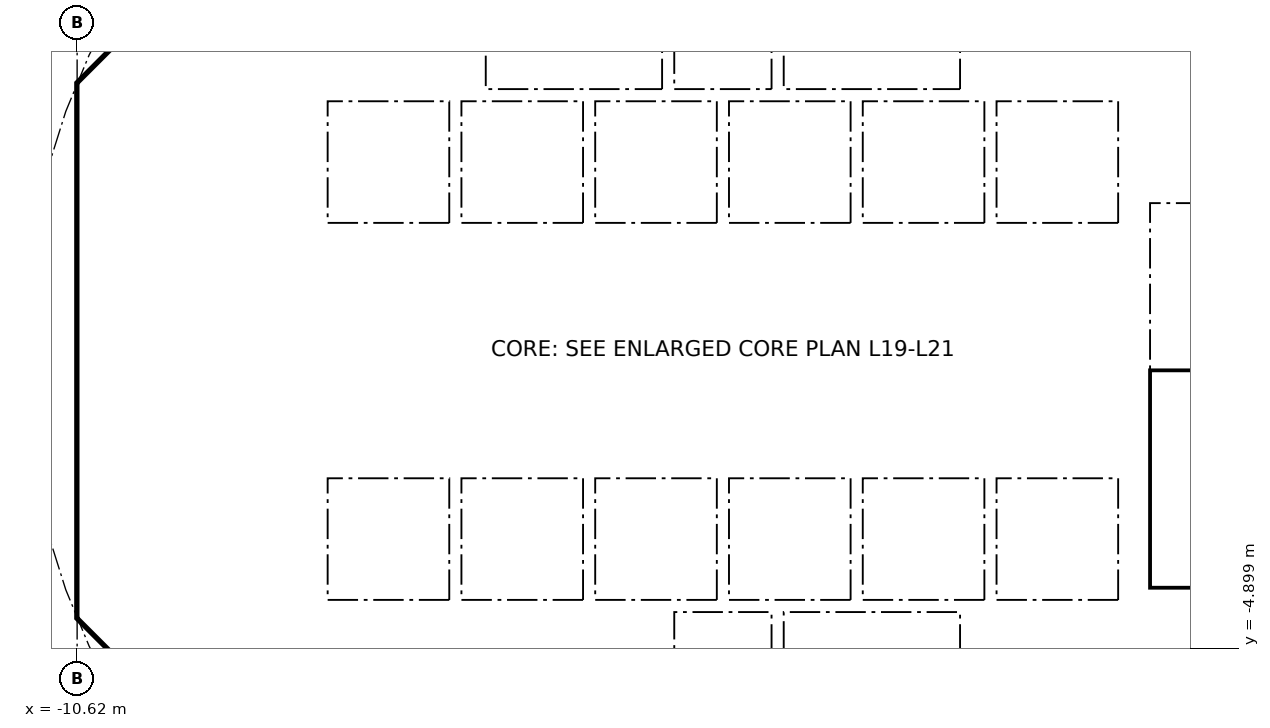
"""IFC4 building model, lengths in metres.
Left out: names, types, materials, properties, quantities, classifications, styles, units other than length and angle.
Written with IfcOpenShell. Run it as: python <this file> out.ifc"""

import sys

from ifc_helpers import new_model, si_unit, direction, frame, frame_2d, origin, place, context, subcontext, project, spatial, polyline, rectangle, outline, extrude, element, fill, save


model = new_model("IFC4")
c1 = context("Model", 3, precision=1e-05, world=origin(), true_north=direction((0.0, 1.0)))
c2 = subcontext(c1, "Body", "Model", "MODEL_VIEW")
j1 = project(units=[si_unit("LENGTHUNIT", "METRE"), si_unit("PLANEANGLEUNIT", "RADIAN")], contexts=[c1])
p1 = place(None, origin())
s1 = spatial("IfcSite", under=j1, at=p1, CompositionType="ELEMENT")
p2 = place(p1, origin())
s2 = spatial("IfcBuilding", under=s1, at=p2, CompositionType="ELEMENT")
p3 = place(p2, frame((0.0, 0.0, 84.4)))
s3 = spatial("IfcBuildingStorey", under=s2, at=p3, CompositionType="ELEMENT", Elevation=84.4)
p4 = place(p3, frame((9.988, 4.613, 0.0), z_axis=(0.0, 0.0, 1.0), x_axis=(-0.707106781187, 0.707106781187, 0.0)))
e1 = element("IfcWall", 1, at=p4, inside=s3, PredefinedType="SHEAR", context=c2, shape_type="SweptSolid", body=[
    extrude(rectangle(XDim=7.602, YDim=0.6, at=frame_2d((3.801, 0.0))), origin(), (0.0, 0.0, 1.0), 3.44),
])
p5 = place(p4, frame((3.201, 0.0, 0.0)))
e2 = element("IfcOpeningElement", 2, at=p5, cuts=e1, PredefinedType="OPENING", context=c2, shape_type="SweptSolid", body=[
    extrude(rectangle(XDim=1.2, YDim=2.1, at=frame_2d((0.6, 1.05))), frame((0.0, 0.31, 0.0), z_axis=(0.0, -1.0, 0.0), x_axis=(1.0, 0.0, 0.0)), (0.0, 0.0, 1.0), 0.62),
])
p6 = place(p3, frame((-4.613, 9.988, 0.0), z_axis=(0.0, 0.0, 1.0), x_axis=(-0.707106781187, -0.707106781187, 0.0)))
e3 = element("IfcWall", 3, at=p6, inside=s3, PredefinedType="SHEAR", context=c2, shape_type="SweptSolid", body=[
    extrude(rectangle(XDim=7.602, YDim=0.6, at=frame_2d((3.801, 0.0))), origin(), (0.0, 0.0, 1.0), 3.44),
])
p7 = place(p6, frame((0.351, 0.0, 0.0)))
e4 = element("IfcOpeningElement", 4, at=p7, cuts=e3, PredefinedType="OPENING", context=c2, shape_type="SweptSolid", body=[
    extrude(rectangle(XDim=1.1, YDim=2.1, at=frame_2d((0.55, 1.05))), frame((0.0, 0.31, 0.0), z_axis=(0.0, -1.0, 0.0), x_axis=(1.0, 0.0, 0.0)), (0.0, 0.0, 1.0), 0.62),
])
p8 = place(p3, frame((-10.325, 3.801, 0.0), z_axis=(0.0, 0.0, 1.0), x_axis=(0.0, -1.0, 0.0)))
e5 = element("IfcWall", 5, at=p8, inside=s3, PredefinedType="SHEAR", context=c2, shape_type="SweptSolid", body=[
    extrude(rectangle(XDim=7.602, YDim=0.6, at=frame_2d((3.801, 0.0))), origin(), (0.0, 0.0, 1.0), 3.44),
])
p9 = place(p8, frame((0.651, 0.0, 0.0)))
e6 = element("IfcOpeningElement", 6, at=p9, cuts=e5, PredefinedType="OPENING", context=c2, shape_type="SweptSolid", body=[
    extrude(rectangle(XDim=1.5, YDim=2.1, at=frame_2d((0.75, 1.05))), frame((0.0, 0.31, 0.0), z_axis=(0.0, -1.0, 0.0), x_axis=(1.0, 0.0, 0.0)), (0.0, 0.0, 1.0), 0.62),
])
p10 = place(p8, frame((5.451, 0.0, 0.0)))
e7 = element("IfcOpeningElement", 7, at=p10, cuts=e5, PredefinedType="OPENING", context=c2, shape_type="SweptSolid", body=[
    extrude(rectangle(XDim=1.5, YDim=2.1, at=frame_2d((0.75, 1.05))), frame((0.0, 0.31, 0.0), z_axis=(0.0, -1.0, 0.0), x_axis=(1.0, 0.0, 0.0)), (0.0, 0.0, 1.0), 0.62),
])
p11 = place(p3, frame((-9.988, -4.613, 0.0), z_axis=(0.0, 0.0, 1.0), x_axis=(0.707106781187, -0.707106781187, 0.0)))
e8 = element("IfcWall", 8, at=p11, inside=s3, PredefinedType="SHEAR", context=c2, shape_type="SweptSolid", body=[
    extrude(rectangle(XDim=7.602, YDim=0.6, at=frame_2d((3.801, 0.0))), origin(), (0.0, 0.0, 1.0), 3.44),
])
p12 = place(p11, frame((6.151, 0.0, 0.0)))
e9 = element("IfcOpeningElement", 9, at=p12, cuts=e8, PredefinedType="OPENING", context=c2, shape_type="SweptSolid", body=[
    extrude(rectangle(XDim=1.1, YDim=2.1, at=frame_2d((0.55, 1.05))), frame((0.0, 0.31, 0.0), z_axis=(0.0, -1.0, 0.0), x_axis=(1.0, 0.0, 0.0)), (0.0, 0.0, 1.0), 0.62),
])
p13 = place(p3, frame((4.613, -9.988, 0.0), z_axis=(0.0, 0.0, 1.0), x_axis=(0.707106781187, 0.707106781187, 0.0)))
e10 = element("IfcWall", 10, at=p13, inside=s3, PredefinedType="SHEAR", context=c2, shape_type="SweptSolid", body=[
    extrude(rectangle(XDim=7.602, YDim=0.6, at=frame_2d((3.801, 0.0))), origin(), (0.0, 0.0, 1.0), 3.44),
])
p14 = place(p13, frame((3.201, 0.0, 0.0)))
e11 = element("IfcOpeningElement", 11, at=p14, cuts=e10, PredefinedType="OPENING", context=c2, shape_type="SweptSolid", body=[
    extrude(rectangle(XDim=1.2, YDim=2.1, at=frame_2d((0.6, 1.05))), frame((0.0, 0.31, 0.0), z_axis=(0.0, -1.0, 0.0), x_axis=(1.0, 0.0, 0.0)), (0.0, 0.0, 1.0), 0.62),
])
p15 = place(p3, frame((-5.8, 4.3, 0.0), z_axis=(0.0, 0.0, 1.0), x_axis=(0.0, 1.0, 0.0)))
e12 = element("IfcWall", 12, at=p15, inside=s3, PredefinedType="PARTITIONING", context=c2, shape_type="SweptSolid", body=[
    extrude(rectangle(XDim=3.927, YDim=0.15, at=frame_2d((1.963, 0.0))), origin(), (0.0, 0.0, 1.0), 3.44),
])
p16 = place(p15, frame((1.551, 0.0, 0.0)))
e13 = element("IfcOpeningElement", 13, at=p16, cuts=e12, PredefinedType="OPENING", context=c2, shape_type="SweptSolid", body=[
    extrude(rectangle(XDim=0.9, YDim=2.1, at=frame_2d((0.45, 1.05))), frame((0.0, 0.085, 0.0), z_axis=(0.0, -1.0, 0.0), x_axis=(1.0, 0.0, 0.0)), (0.0, 0.0, 1.0), 0.17),
])
p17 = place(p3, frame((4.0, 4.3, 0.0), z_axis=(0.0, 0.0, 1.0), x_axis=(0.0, 1.0, 0.0)))
e14 = element("IfcWall", 14, at=p17, inside=s3, PredefinedType="SOLIDWALL", context=c2, shape_type="SweptSolid", body=[
    extrude(rectangle(XDim=2.2, YDim=0.2, at=frame_2d((1.1, 0.0))), origin(), (0.0, 0.0, 1.0), 3.44),
])
p18 = place(p17, frame((0.55, 0.0, 0.0)))
e15 = element("IfcOpeningElement", 15, at=p18, cuts=e14, PredefinedType="OPENING", context=c2, shape_type="SweptSolid", body=[
    extrude(rectangle(XDim=1.1, YDim=2.1, at=frame_2d((0.55, 1.05))), frame((0.0, 0.11, 0.0), z_axis=(0.0, -1.0, 0.0), x_axis=(1.0, 0.0, 0.0)), (0.0, 0.0, 1.0), 0.22),
])
p19 = place(p3, frame((-4.0, 4.3, 0.0), z_axis=(0.0, 0.0, 1.0), x_axis=(0.0, 1.0, 0.0)))
e16 = element("IfcWall", 16, at=p19, inside=s3, PredefinedType="SOLIDWALL", context=c2, shape_type="SweptSolid", body=[
    extrude(rectangle(XDim=2.2, YDim=0.2, at=frame_2d((1.1, 0.0))), origin(), (0.0, 0.0, 1.0), 3.44),
])
p20 = place(p19, frame((0.55, 0.0, 0.0)))
e17 = element("IfcOpeningElement", 17, at=p20, cuts=e16, PredefinedType="OPENING", context=c2, shape_type="SweptSolid", body=[
    extrude(rectangle(XDim=1.1, YDim=2.1, at=frame_2d((0.55, 1.05))), frame((0.0, 0.11, 0.0), z_axis=(0.0, -1.0, 0.0), x_axis=(1.0, 0.0, 0.0)), (0.0, 0.0, 1.0), 0.22),
])
p21 = place(p3, frame((-6.7, 2.0, 0.0), z_axis=(0.0, 0.0, 1.0), x_axis=(1.0, 0.0, 0.0)))
e18 = element("IfcWall", 18, at=p21, inside=s3, PredefinedType="SOLIDWALL", context=c2, shape_type="SweptSolid", body=[
    extrude(rectangle(XDim=13.4, YDim=0.2, at=frame_2d((6.7, 0.0))), origin(), (0.0, 0.0, 1.0), 3.44),
])
p22 = place(p21, frame((0.65, 0.0, 0.0)))
e19 = element("IfcOpeningElement", 19, at=p22, cuts=e18, PredefinedType="OPENING", context=c2, shape_type="SweptSolid", body=[
    extrude(rectangle(XDim=1.1, YDim=2.1, at=frame_2d((0.55, 1.05))), frame((0.0, 0.11, 0.0), z_axis=(0.0, -1.0, 0.0), x_axis=(1.0, 0.0, 0.0)), (0.0, 0.0, 1.0), 0.22),
])
p23 = place(p21, frame((2.85, 0.0, 0.0)))
e20 = element("IfcOpeningElement", 20, at=p23, cuts=e18, PredefinedType="OPENING", context=c2, shape_type="SweptSolid", body=[
    extrude(rectangle(XDim=1.1, YDim=2.1, at=frame_2d((0.55, 1.05))), frame((0.0, 0.11, 0.0), z_axis=(0.0, -1.0, 0.0), x_axis=(1.0, 0.0, 0.0)), (0.0, 0.0, 1.0), 0.22),
])
p24 = place(p21, frame((5.05, 0.0, 0.0)))
e21 = element("IfcOpeningElement", 21, at=p24, cuts=e18, PredefinedType="OPENING", context=c2, shape_type="SweptSolid", body=[
    extrude(rectangle(XDim=1.1, YDim=2.1, at=frame_2d((0.55, 1.05))), frame((0.0, 0.11, 0.0), z_axis=(0.0, -1.0, 0.0), x_axis=(1.0, 0.0, 0.0)), (0.0, 0.0, 1.0), 0.22),
])
p25 = place(p3, frame((6.7, 4.0, 0.0), z_axis=(0.0, 0.0, 1.0), x_axis=(1.0, 0.0, 0.0)))
e22 = element("IfcWall", 22, at=p25, inside=s3, PredefinedType="SOLIDWALL", context=c2, shape_type="SweptSolid", body=[
    extrude(rectangle(XDim=3.325, YDim=0.2, at=frame_2d((1.662, 0.0))), origin(), (0.0, 0.0, 1.0), 3.44),
])
p26 = place(p25, frame((1.25, 0.0, 0.0)))
e23 = element("IfcOpeningElement", 23, at=p26, cuts=e22, PredefinedType="OPENING", context=c2, shape_type="SweptSolid", body=[
    extrude(rectangle(XDim=1.1, YDim=2.1, at=frame_2d((0.55, 1.05))), frame((0.0, 0.11, 0.0), z_axis=(0.0, -1.0, 0.0), x_axis=(1.0, 0.0, 0.0)), (0.0, 0.0, 1.0), 0.22),
])
p27 = place(p3, frame((-6.2, -7.827, 0.0), z_axis=(0.0, 0.0, 1.0), x_axis=(0.0, 1.0, 0.0)))
e24 = element("IfcWall", 24, at=p27, inside=s3, PredefinedType="PARTITIONING", context=c2, shape_type="SweptSolid", body=[
    extrude(rectangle(XDim=3.527, YDim=0.15, at=frame_2d((1.763, 0.0))), origin(), (0.0, 0.0, 1.0), 3.44),
])
p28 = place(p27, frame((2.365, 0.0, 0.0)))
e25 = element("IfcOpeningElement", 25, at=p28, cuts=e24, PredefinedType="OPENING", context=c2, shape_type="SweptSolid", body=[
    extrude(rectangle(XDim=0.9, YDim=2.1, at=frame_2d((0.45, 1.05))), frame((0.0, 0.085, 0.0), z_axis=(0.0, -1.0, 0.0), x_axis=(1.0, 0.0, 0.0)), (0.0, 0.0, 1.0), 0.17),
])
p29 = place(p27, frame((0.489, 0.0, 0.0)))
e26 = element("IfcOpeningElement", 26, at=p29, cuts=e24, PredefinedType="OPENING", context=c2, shape_type="SweptSolid", body=[
    extrude(rectangle(XDim=0.9, YDim=2.1, at=frame_2d((0.45, 1.05))), frame((0.0, 0.085, 0.0), z_axis=(0.0, -1.0, 0.0), x_axis=(1.0, 0.0, 0.0)), (0.0, 0.0, 1.0), 0.17),
])
p30 = place(p3, frame((4.0, -6.5, 0.0), z_axis=(0.0, 0.0, 1.0), x_axis=(0.0, 1.0, 0.0)))
e27 = element("IfcWall", 27, at=p30, inside=s3, PredefinedType="SOLIDWALL", context=c2, shape_type="SweptSolid", body=[
    extrude(rectangle(XDim=2.2, YDim=0.2, at=frame_2d((1.1, 0.0))), origin(), (0.0, 0.0, 1.0), 3.44),
])
p31 = place(p30, frame((0.55, 0.0, 0.0)))
e28 = element("IfcOpeningElement", 28, at=p31, cuts=e27, PredefinedType="OPENING", context=c2, shape_type="SweptSolid", body=[
    extrude(rectangle(XDim=1.1, YDim=2.1, at=frame_2d((0.55, 1.05))), frame((0.0, 0.11, 0.0), z_axis=(0.0, -1.0, 0.0), x_axis=(1.0, 0.0, 0.0)), (0.0, 0.0, 1.0), 0.22),
])
p32 = place(p3, frame((-4.0, -6.5, 0.0), z_axis=(0.0, 0.0, 1.0), x_axis=(0.0, 1.0, 0.0)))
e29 = element("IfcWall", 29, at=p32, inside=s3, PredefinedType="SOLIDWALL", context=c2, shape_type="SweptSolid", body=[
    extrude(rectangle(XDim=2.2, YDim=0.2, at=frame_2d((1.1, 0.0))), origin(), (0.0, 0.0, 1.0), 3.44),
])
p33 = place(p32, frame((0.65, 0.0, 0.0)))
e30 = element("IfcOpeningElement", 30, at=p33, cuts=e29, PredefinedType="OPENING", context=c2, shape_type="SweptSolid", body=[
    extrude(rectangle(XDim=0.9, YDim=2.1, at=frame_2d((0.45, 1.05))), frame((0.0, 0.11, 0.0), z_axis=(0.0, -1.0, 0.0), x_axis=(1.0, 0.0, 0.0)), (0.0, 0.0, 1.0), 0.22),
])
p34 = place(p3, frame((-6.7, -2.0, 0.0), z_axis=(0.0, 0.0, 1.0), x_axis=(1.0, 0.0, 0.0)))
e31 = element("IfcWall", 31, at=p34, inside=s3, PredefinedType="SOLIDWALL", context=c2, shape_type="SweptSolid", body=[
    extrude(rectangle(XDim=13.4, YDim=0.2, at=frame_2d((6.7, 0.0))), origin(), (0.0, 0.0, 1.0), 3.44),
])
p35 = place(p34, frame((0.65, 0.0, 0.0)))
e32 = element("IfcOpeningElement", 32, at=p35, cuts=e31, PredefinedType="OPENING", context=c2, shape_type="SweptSolid", body=[
    extrude(rectangle(XDim=1.1, YDim=2.1, at=frame_2d((0.55, 1.05))), frame((0.0, 0.11, 0.0), z_axis=(0.0, -1.0, 0.0), x_axis=(1.0, 0.0, 0.0)), (0.0, 0.0, 1.0), 0.22),
])
p36 = place(p34, frame((2.85, 0.0, 0.0)))
e33 = element("IfcOpeningElement", 33, at=p36, cuts=e31, PredefinedType="OPENING", context=c2, shape_type="SweptSolid", body=[
    extrude(rectangle(XDim=1.1, YDim=2.1, at=frame_2d((0.55, 1.05))), frame((0.0, 0.11, 0.0), z_axis=(0.0, -1.0, 0.0), x_axis=(1.0, 0.0, 0.0)), (0.0, 0.0, 1.0), 0.22),
])
p37 = place(p3, origin())
e34 = element("IfcWall", 34, at=p37, inside=s3, PredefinedType="SHEAR", context=c2, shape_type="SweptSolid", body=[
    extrude(outline(polyline([(-10.625, -3.801), (-10.025, -3.801), (-10.025, -4.152), (-9.776, -4.401), (-10.2, -4.825), (-10.625, -4.401), (-10.625, -3.801)])), origin(), (0.0, 0.0, 1.0), 3.44),
])
p38 = place(p3, origin())
e35 = element("IfcWall", 35, at=p38, inside=s3, PredefinedType="SHEAR", context=c2, shape_type="SweptSolid", body=[
    extrude(outline(polyline([(-10.2, 4.825), (-9.776, 4.401), (-10.025, 4.152), (-10.025, 3.801), (-10.625, 3.801), (-10.625, 4.401), (-10.2, 4.825)])), origin(), (0.0, 0.0, 1.0), 3.44),
])
for number, where, z_axis, x_axis in (
    (36, (-0.9, -6.5, 0.0), (0.0, 0.0, 1.0), (0.0, 1.0, 0.0)),
    (37, (0.9, -6.5, 0.0), (0.0, 0.0, 1.0), (0.0, 1.0, 0.0)),
):
    element("IfcWall", number, at=place(p3, frame(where, z_axis=z_axis, x_axis=x_axis)), inside=s3, PredefinedType="SOLIDWALL", context=c2, shape_type="SweptSolid", body=[
        extrude(rectangle(XDim=2.2, YDim=0.2, at=frame_2d((1.1, 0.0))), origin(), (0.0, 0.0, 1.0), 3.44),
    ])
p39 = place(p3, origin())
e38 = element("IfcWall", 38, at=p39, inside=s3, PredefinedType="SOLIDWALL", context=c2, shape_type="SweptSolid", body=[
    extrude(outline(polyline([(-6.7, -2.1), (-6.5, -2.1), (-6.5, -4.1), (-4.5, -4.1), (-4.5, -2.1), (-4.3, -2.1), (-4.3, -4.1), (-2.3, -4.1), (-2.3, -2.1), (-2.1, -2.1), (-2.1, -4.1), (-0.1, -4.1), (-0.1, -2.1), (0.1, -2.1), (0.1, -4.1), (2.1, -4.1), (2.1, -2.1), (2.3, -2.1), (2.3, -4.1), (4.3, -4.1), (4.3, -2.1), (4.5, -2.1), (4.5, -4.1), (6.5, -4.1), (6.5, -2.1), (6.7, -2.1), (6.7, -4.3), (-6.7, -4.3), (-6.7, -2.1)])), origin(), (0.0, 0.0, 1.0), 3.44),
])
for number, where, z_axis, x_axis in (
    (39, (-0.9, 4.3, 0.0), (0.0, 0.0, 1.0), (0.0, 1.0, 0.0)),
    (40, (0.9, 4.3, 0.0), (0.0, 0.0, 1.0), (0.0, 1.0, 0.0)),
):
    element("IfcWall", number, at=place(p3, frame(where, z_axis=z_axis, x_axis=x_axis)), inside=s3, PredefinedType="SOLIDWALL", context=c2, shape_type="SweptSolid", body=[
        extrude(rectangle(XDim=2.2, YDim=0.2, at=frame_2d((1.1, 0.0))), origin(), (0.0, 0.0, 1.0), 3.44),
    ])
p40 = place(p3, origin())
e41 = element("IfcWall", 41, at=p40, inside=s3, PredefinedType="SOLIDWALL", context=c2, shape_type="SweptSolid", body=[
    extrude(outline(polyline([(-6.5, 2.1), (-6.7, 2.1), (-6.7, 4.3), (6.7, 4.3), (6.7, 2.1), (6.5, 2.1), (6.5, 4.1), (4.5, 4.1), (4.5, 2.1), (4.3, 2.1), (4.3, 4.1), (2.3, 4.1), (2.3, 2.1), (2.1, 2.1), (2.1, 4.1), (0.1, 4.1), (0.1, 2.1), (-0.1, 2.1), (-0.1, 4.1), (-2.1, 4.1), (-2.1, 2.1), (-2.3, 2.1), (-2.3, 4.1), (-4.3, 4.1), (-4.3, 2.1), (-4.5, 2.1), (-4.5, 4.1), (-6.5, 4.1), (-6.5, 2.1)])), origin(), (0.0, 0.0, 1.0), 3.44),
])
for number, where, z_axis, x_axis in (
    (42, (-10.025, -4.0, 0.0), (0.0, 0.0, 1.0), (1.0, 0.0, 0.0)),
    (43, (-10.025, 4.0, 0.0), (0.0, 0.0, 1.0), (1.0, 0.0, 0.0)),
):
    element("IfcWall", number, at=place(p3, frame(where, z_axis=z_axis, x_axis=x_axis)), inside=s3, PredefinedType="PARTITIONING", context=c2, shape_type="SweptSolid", body=[
        extrude(rectangle(XDim=3.325, YDim=0.2, at=frame_2d((1.662, 0.0))), origin(), (0.0, 0.0, 1.0), 3.44),
    ])
p41 = place(p3, origin())
e44 = element("IfcWall", 44, at=p41, inside=s3, PredefinedType="SOLIDWALL", context=c2, shape_type="SweptSolid", body=[
    extrude(outline(polyline([(7.025, -3.9), (6.7, -3.9), (6.7, 3.9), (7.025, 3.9), (7.025, -3.9)])), origin(), (0.0, 0.0, 1.0), 3.44),
])
p42 = place(p3, origin())
e45 = element("IfcWall", 45, at=p42, inside=s3, PredefinedType="SOLIDWALL", context=c2, shape_type="SweptSolid", body=[
    extrude(outline(polyline([(10.025, -4.1), (6.7, -4.1), (6.7, -3.9), (10.025, -3.9), (10.025, -4.1)])), origin(), (0.0, 0.0, 1.0), 3.44),
])
p43 = place(p22, origin())
e46 = element("IfcDoor", 46, at=p43, inside=s3, OperationType="DOUBLE_DOOR_SLIDING", PredefinedType="DOOR", context=c2, shape_type="SweptSolid", body=[
    extrude(rectangle(XDim=1.1, YDim=2.1, at=frame_2d((0.55, 1.05))), frame((0.0, 0.025, 0.0), z_axis=(0.0, -1.0, 0.0), x_axis=(1.0, 0.0, 0.0)), (0.0, 0.0, 1.0), 0.05),
])
fill(e19, e46)
p44 = place(p23, origin())
e47 = element("IfcDoor", 47, at=p44, inside=s3, OperationType="DOUBLE_DOOR_SLIDING", PredefinedType="DOOR", context=c2, shape_type="SweptSolid", body=[
    extrude(rectangle(XDim=1.1, YDim=2.1, at=frame_2d((0.55, 1.05))), frame((0.0, 0.025, 0.0), z_axis=(0.0, -1.0, 0.0), x_axis=(1.0, 0.0, 0.0)), (0.0, 0.0, 1.0), 0.05),
])
fill(e20, e47)
p45 = place(p24, origin())
e48 = element("IfcDoor", 48, at=p45, inside=s3, OperationType="DOUBLE_DOOR_SLIDING", PredefinedType="DOOR", context=c2, shape_type="SweptSolid", body=[
    extrude(rectangle(XDim=1.1, YDim=2.1, at=frame_2d((0.55, 1.05))), frame((0.0, 0.025, 0.0), z_axis=(0.0, -1.0, 0.0), x_axis=(1.0, 0.0, 0.0)), (0.0, 0.0, 1.0), 0.05),
])
fill(e21, e48)
p46 = place(p35, origin())
e49 = element("IfcDoor", 49, at=p46, inside=s3, OperationType="DOUBLE_DOOR_SLIDING", PredefinedType="DOOR", context=c2, shape_type="SweptSolid", body=[
    extrude(rectangle(XDim=1.1, YDim=2.1, at=frame_2d((0.55, 1.05))), frame((0.0, 0.025, 0.0), z_axis=(0.0, -1.0, 0.0), x_axis=(1.0, 0.0, 0.0)), (0.0, 0.0, 1.0), 0.05),
])
fill(e32, e49)
p47 = place(p36, origin())
e50 = element("IfcDoor", 50, at=p47, inside=s3, OperationType="DOUBLE_DOOR_SLIDING", PredefinedType="DOOR", context=c2, shape_type="SweptSolid", body=[
    extrude(rectangle(XDim=1.1, YDim=2.1, at=frame_2d((0.55, 1.05))), frame((0.0, 0.025, 0.0), z_axis=(0.0, -1.0, 0.0), x_axis=(1.0, 0.0, 0.0)), (0.0, 0.0, 1.0), 0.05),
])
fill(e33, e50)
p48 = place(p18, origin())
e51 = element("IfcDoor", 51, at=p48, inside=s3, OperationType="DOUBLE_DOOR_SLIDING", PredefinedType="DOOR", context=c2, shape_type="SweptSolid", body=[
    extrude(rectangle(XDim=1.1, YDim=2.1, at=frame_2d((0.55, 1.05))), frame((0.0, 0.025, 0.0), z_axis=(0.0, -1.0, 0.0), x_axis=(1.0, 0.0, 0.0)), (0.0, 0.0, 1.0), 0.05),
])
fill(e15, e51)
p49 = place(p31, origin())
e52 = element("IfcDoor", 52, at=p49, inside=s3, OperationType="DOUBLE_DOOR_SLIDING", PredefinedType="DOOR", context=c2, shape_type="SweptSolid", body=[
    extrude(rectangle(XDim=1.1, YDim=2.1, at=frame_2d((0.55, 1.05))), frame((0.0, 0.025, 0.0), z_axis=(0.0, -1.0, 0.0), x_axis=(1.0, 0.0, 0.0)), (0.0, 0.0, 1.0), 0.05),
])
fill(e28, e52)
p50 = place(p20, origin())
e53 = element("IfcDoor", 53, at=p50, inside=s3, OperationType="DOUBLE_DOOR_SLIDING", PredefinedType="DOOR", context=c2, shape_type="SweptSolid", body=[
    extrude(rectangle(XDim=1.1, YDim=2.1, at=frame_2d((0.55, 1.05))), frame((0.0, 0.025, 0.0), z_axis=(0.0, -1.0, 0.0), x_axis=(1.0, 0.0, 0.0)), (0.0, 0.0, 1.0), 0.05),
])
fill(e17, e53)
p51 = place(p28, origin())
e54 = element("IfcDoor", 54, at=p51, inside=s3, OperationType="SINGLE_SWING_LEFT", PredefinedType="DOOR", context=c2, shape_type="SweptSolid", body=[
    extrude(rectangle(XDim=0.9, YDim=2.1, at=frame_2d((0.45, 1.05))), frame((0.0, 0.025, 0.0), z_axis=(0.0, -1.0, 0.0), x_axis=(1.0, 0.0, 0.0)), (0.0, 0.0, 1.0), 0.05),
])
fill(e25, e54)
p52 = place(p9, origin())
e55 = element("IfcDoor", 55, at=p52, inside=s3, OperationType="DOUBLE_DOOR_SINGLE_SWING", PredefinedType="DOOR", context=c2, shape_type="SweptSolid", body=[
    extrude(rectangle(XDim=1.5, YDim=2.1, at=frame_2d((0.75, 1.05))), frame((0.0, 0.025, 0.0), z_axis=(0.0, -1.0, 0.0), x_axis=(1.0, 0.0, 0.0)), (0.0, 0.0, 1.0), 0.05),
])
fill(e6, e55)
p53 = place(p10, origin())
e56 = element("IfcDoor", 56, at=p53, inside=s3, OperationType="DOUBLE_DOOR_SINGLE_SWING", PredefinedType="DOOR", context=c2, shape_type="SweptSolid", body=[
    extrude(rectangle(XDim=1.5, YDim=2.1, at=frame_2d((0.75, 1.05))), frame((0.0, 0.025, 0.0), z_axis=(0.0, -1.0, 0.0), x_axis=(1.0, 0.0, 0.0)), (0.0, 0.0, 1.0), 0.05),
])
fill(e7, e56)
save(model, sys.argv[1])
